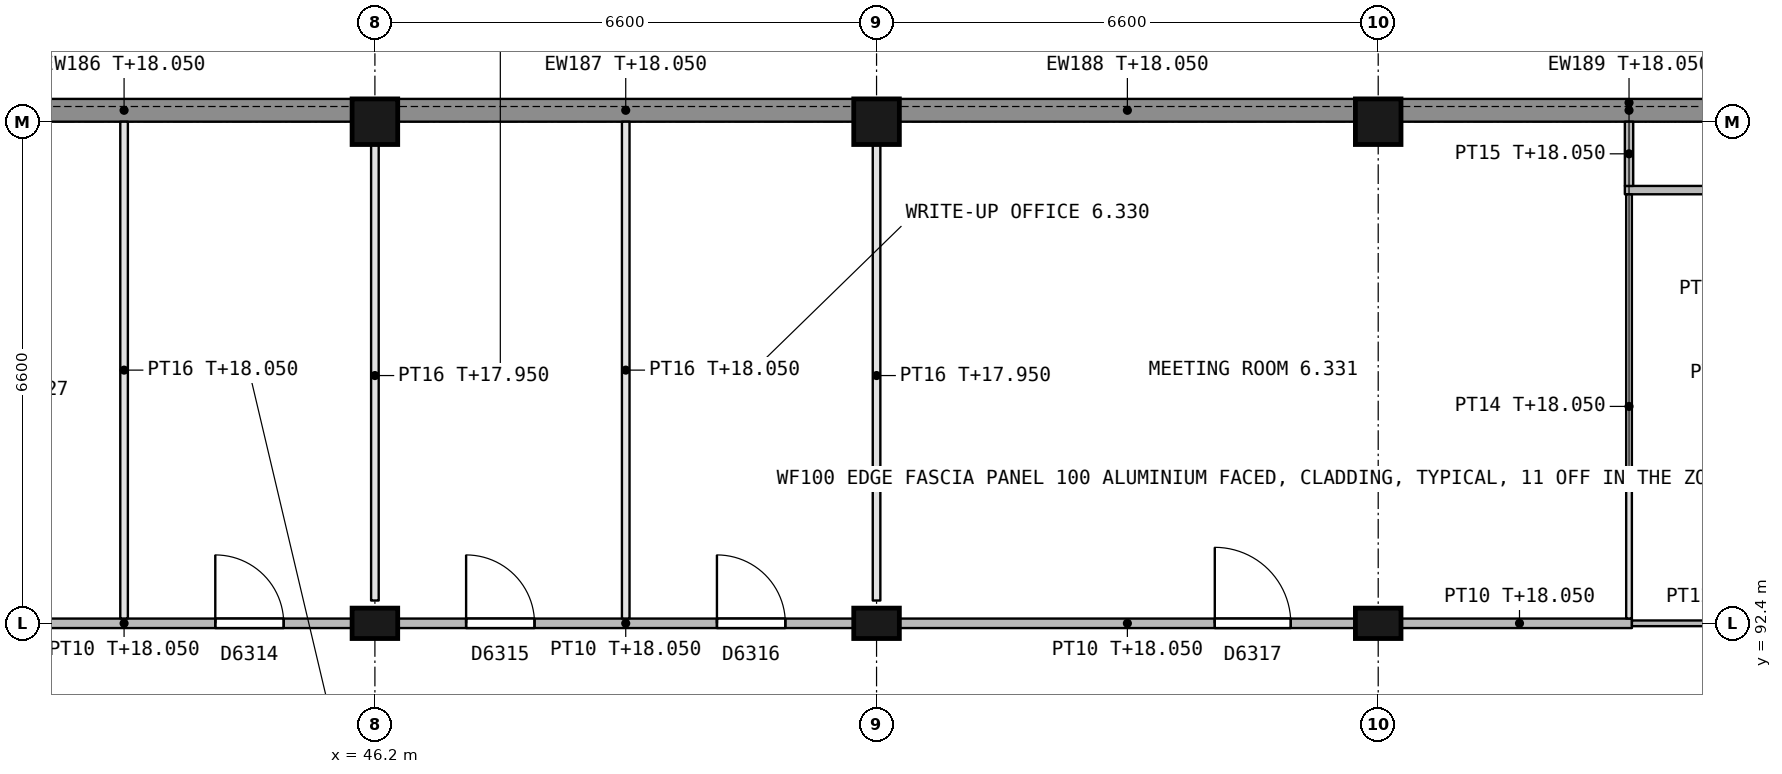
"""IFC4 building model, lengths in metres.
Left out: names, types, materials, properties, quantities, classifications, styles, units other than length and angle.
Written with IfcOpenShell. Run it as: python <this file> out.ifc"""

import sys

from ifc_helpers import new_model, si_unit, direction, frame, frame_2d, origin, origin_2d, place, context, subcontext, project, spatial, rectangle, extrude, element, fill, save


model = new_model("IFC4")
c1 = context("Model", 3, precision=1e-05, world=origin(), true_north=direction((0.0, 1.0)))
c2 = subcontext(c1, "Body", "Model", "MODEL_VIEW")
j1 = project(units=[si_unit("LENGTHUNIT", "METRE"), si_unit("PLANEANGLEUNIT", "RADIAN")], contexts=[c1])
p1 = place(None, origin())
s1 = spatial("IfcSite", under=j1, at=p1, CompositionType="ELEMENT")
p2 = place(p1, origin())
s2 = spatial("IfcBuilding", under=s1, at=p2, CompositionType="ELEMENT")
p3 = place(p2, frame((0.0, 0.0, 14.4)))
s3 = spatial("IfcBuildingStorey", under=s2, at=p3, CompositionType="ELEMENT", Elevation=14.4)
p4 = place(p3, frame((46.2, 92.4, 0.0), z_axis=(0.0, 0.0, 1.0), x_axis=(1.0, 0.0, 0.0)))
e1 = element("IfcColumn", 1, at=p4, inside=s3, PredefinedType="COLUMN", context=c2, shape_type="SweptSolid", body=[
    extrude(rectangle(XDim=0.6, YDim=0.4, at=origin_2d()), origin(), (0.0, 0.0, 1.0), 4.5),
])
p5 = place(p3, frame((46.2, 99.0, 0.0), z_axis=(0.0, 0.0, 1.0), x_axis=(1.0, 0.0, 0.0)))
e2 = element("IfcColumn", 2, at=p5, inside=s3, PredefinedType="COLUMN", context=c2, shape_type="SweptSolid", body=[
    extrude(rectangle(XDim=0.6, YDim=0.6, at=origin_2d()), origin(), (0.0, 0.0, 1.0), 4.5),
])
p6 = place(p3, frame((52.8, 92.4, 0.0), z_axis=(0.0, 0.0, 1.0), x_axis=(1.0, 0.0, 0.0)))
e3 = element("IfcColumn", 3, at=p6, inside=s3, PredefinedType="COLUMN", context=c2, shape_type="SweptSolid", body=[
    extrude(rectangle(XDim=0.6, YDim=0.4, at=origin_2d()), origin(), (0.0, 0.0, 1.0), 4.5),
])
p7 = place(p3, frame((52.8, 99.0, 0.0), z_axis=(0.0, 0.0, 1.0), x_axis=(1.0, 0.0, 0.0)))
e4 = element("IfcColumn", 4, at=p7, inside=s3, PredefinedType="COLUMN", context=c2, shape_type="SweptSolid", body=[
    extrude(rectangle(XDim=0.6, YDim=0.6, at=origin_2d()), origin(), (0.0, 0.0, 1.0), 4.5),
])
p8 = place(p3, frame((59.4, 92.4, 0.0), z_axis=(0.0, 0.0, 1.0), x_axis=(1.0, 0.0, 0.0)))
e5 = element("IfcColumn", 5, at=p8, inside=s3, PredefinedType="COLUMN", context=c2, shape_type="SweptSolid", body=[
    extrude(rectangle(XDim=0.6, YDim=0.4, at=origin_2d()), origin(), (0.0, 0.0, 1.0), 4.5),
])
p9 = place(p3, frame((59.4, 99.0, 0.0), z_axis=(0.0, 0.0, 1.0), x_axis=(1.0, 0.0, 0.0)))
e6 = element("IfcColumn", 6, at=p9, inside=s3, PredefinedType="COLUMN", context=c2, shape_type="SweptSolid", body=[
    extrude(rectangle(XDim=0.6, YDim=0.6, at=origin_2d()), origin(), (0.0, 0.0, 1.0), 4.5),
])
for number, where, z_axis, x_axis in (
    (7, (39.9, 99.15, 0.0), (0.0, 0.0, 1.0), (1.0, 0.0, 0.0)),
    (8, (46.5, 99.15, 0.0), (0.0, 0.0, 1.0), (1.0, 0.0, 0.0)),
    (9, (53.1, 99.15, 0.0), (0.0, 0.0, 1.0), (1.0, 0.0, 0.0)),
    (10, (59.7, 99.15, 0.0), (0.0, 0.0, 1.0), (1.0, 0.0, 0.0)),
):
    element("IfcWall", number, at=place(p3, frame(where, z_axis=z_axis, x_axis=x_axis)), inside=s3, PredefinedType="STANDARD", context=c2, shape_type="SweptSolid", body=[
        extrude(rectangle(XDim=6.0, YDim=0.3, at=frame_2d((3.0, 0.0))), origin(), (0.0, 0.0, 1.0), 3.65),
    ])
p10 = place(p3, frame((39.9, 92.4, 0.0), z_axis=(0.0, 0.0, 1.0), x_axis=(1.0, 0.0, 0.0)))
e11 = element("IfcWall", 11, at=p10, inside=s3, PredefinedType="PARTITIONING", context=c2, shape_type="SweptSolid", body=[
    extrude(rectangle(XDim=6.0, YDim=0.125, at=frame_2d((3.0, 0.0))), origin(), (0.0, 0.0, 1.0), 3.65),
])
p11 = place(p10, frame((0.9, 0.0, 0.0)))
e12 = element("IfcOpeningElement", 12, at=p11, cuts=e11, PredefinedType="OPENING", context=c2, shape_type="SweptSolid", body=[
    extrude(rectangle(XDim=0.9, YDim=2.1, at=frame_2d((0.45, 1.05))), frame((0.0, 0.073, 0.0), z_axis=(0.0, -1.0, 0.0), x_axis=(1.0, 0.0, 0.0)), (0.0, 0.0, 1.0), 0.145),
])
p12 = place(p10, frame((4.2, 0.0, 0.0)))
e13 = element("IfcOpeningElement", 13, at=p12, cuts=e11, PredefinedType="OPENING", context=c2, shape_type="SweptSolid", body=[
    extrude(rectangle(XDim=0.9, YDim=2.1, at=frame_2d((0.45, 1.05))), frame((0.0, 0.073, 0.0), z_axis=(0.0, -1.0, 0.0), x_axis=(1.0, 0.0, 0.0)), (0.0, 0.0, 1.0), 0.145),
])
p13 = place(p3, frame((46.5, 92.4, 0.0), z_axis=(0.0, 0.0, 1.0), x_axis=(1.0, 0.0, 0.0)))
e14 = element("IfcWall", 14, at=p13, inside=s3, PredefinedType="PARTITIONING", context=c2, shape_type="SweptSolid", body=[
    extrude(rectangle(XDim=6.0, YDim=0.125, at=frame_2d((3.0, 0.0))), origin(), (0.0, 0.0, 1.0), 3.65),
])
p14 = place(p13, frame((0.9, 0.0, 0.0)))
e15 = element("IfcOpeningElement", 15, at=p14, cuts=e14, PredefinedType="OPENING", context=c2, shape_type="SweptSolid", body=[
    extrude(rectangle(XDim=0.9, YDim=2.1, at=frame_2d((0.45, 1.05))), frame((0.0, 0.073, 0.0), z_axis=(0.0, -1.0, 0.0), x_axis=(1.0, 0.0, 0.0)), (0.0, 0.0, 1.0), 0.145),
])
p15 = place(p13, frame((4.2, 0.0, 0.0)))
e16 = element("IfcOpeningElement", 16, at=p15, cuts=e14, PredefinedType="OPENING", context=c2, shape_type="SweptSolid", body=[
    extrude(rectangle(XDim=0.9, YDim=2.1, at=frame_2d((0.45, 1.05))), frame((0.0, 0.073, 0.0), z_axis=(0.0, -1.0, 0.0), x_axis=(1.0, 0.0, 0.0)), (0.0, 0.0, 1.0), 0.145),
])
p16 = place(p3, frame((53.1, 92.4, 0.0), z_axis=(0.0, 0.0, 1.0), x_axis=(1.0, 0.0, 0.0)))
e17 = element("IfcWall", 17, at=p16, inside=s3, PredefinedType="PARTITIONING", context=c2, shape_type="SweptSolid", body=[
    extrude(rectangle(XDim=6.0, YDim=0.125, at=frame_2d((3.0, 0.0))), origin(), (0.0, 0.0, 1.0), 3.65),
])
p17 = place(p16, frame((4.15, 0.0, 0.0)))
e18 = element("IfcOpeningElement", 18, at=p17, cuts=e17, PredefinedType="OPENING", context=c2, shape_type="SweptSolid", body=[
    extrude(rectangle(XDim=1.0, YDim=2.1, at=frame_2d((0.5, 1.05))), frame((0.0, 0.073, 0.0), z_axis=(0.0, -1.0, 0.0), x_axis=(1.0, 0.0, 0.0)), (0.0, 0.0, 1.0), 0.145),
])
p18 = place(p3, frame((59.7, 92.4, 0.0), z_axis=(0.0, 0.0, 1.0), x_axis=(1.0, 0.0, 0.0)))
e19 = element("IfcWall", 19, at=p18, inside=s3, PredefinedType="PARTITIONING", context=c2, shape_type="SweptSolid", body=[
    extrude(rectangle(XDim=3.038, YDim=0.125, at=frame_2d((1.519, 0.0))), origin(), (0.0, 0.0, 1.0), 3.65),
])
p19 = place(p3, frame((62.738, 92.4, 0.0), z_axis=(0.0, 0.0, 1.0), x_axis=(1.0, 0.0, 0.0)))
e20 = element("IfcWall", 20, at=p19, inside=s3, PredefinedType="PARTITIONING", context=c2, shape_type="SweptSolid", body=[
    extrude(rectangle(XDim=2.962, YDim=0.075, at=frame_2d((1.481, 0.0))), origin(), (0.0, 0.0, 1.0), 3.65),
])
p20 = place(p3, frame((66.055, 98.1, 0.0), z_axis=(0.0, 0.0, 1.0), x_axis=(-1.0, 0.0, 0.0)))
e21 = element("IfcWall", 21, at=p20, inside=s3, PredefinedType="PARTITIONING", context=c2, shape_type="SweptSolid", body=[
    extrude(rectangle(XDim=3.41, YDim=0.11, at=frame_2d((1.705, 0.0))), origin(), (0.0, 0.0, 1.0), 3.55),
])
p21 = place(p20, frame((1.405, 0.0, 0.0)))
e22 = element("IfcOpeningElement", 22, at=p21, cuts=e21, PredefinedType="OPENING", context=c2, shape_type="SweptSolid", body=[
    extrude(rectangle(XDim=0.6, YDim=2.1, at=frame_2d((0.3, 1.05))), frame((0.0, 0.065, 0.0), z_axis=(0.0, -1.0, 0.0), x_axis=(1.0, 0.0, 0.0)), (0.0, 0.0, 1.0), 0.13),
])
p22 = place(p3, frame((42.9, 92.463, 0.0), z_axis=(0.0, 0.0, 1.0), x_axis=(0.0, 1.0, 0.0)))
e23 = element("IfcWall", 23, at=p22, inside=s3, PredefinedType="PARTITIONING", context=c2, shape_type="SweptSolid", body=[
    extrude(rectangle(XDim=6.537, YDim=0.1, at=frame_2d((3.269, 0.0))), origin(), (0.0, 0.0, 1.0), 3.65),
])
p23 = place(p3, frame((46.2, 92.7, 0.0), z_axis=(0.0, 0.0, 1.0), x_axis=(0.0, 1.0, 0.0)))
e24 = element("IfcWall", 24, at=p23, inside=s3, PredefinedType="PARTITIONING", context=c2, shape_type="SweptSolid", body=[
    extrude(rectangle(XDim=6.0, YDim=0.1, at=frame_2d((3.0, 0.0))), origin(), (0.0, 0.0, 1.0), 3.55),
])
p24 = place(p3, frame((49.5, 92.463, 0.0), z_axis=(0.0, 0.0, 1.0), x_axis=(0.0, 1.0, 0.0)))
e25 = element("IfcWall", 25, at=p24, inside=s3, PredefinedType="PARTITIONING", context=c2, shape_type="SweptSolid", body=[
    extrude(rectangle(XDim=6.537, YDim=0.1, at=frame_2d((3.269, 0.0))), origin(), (0.0, 0.0, 1.0), 3.65),
])
p25 = place(p3, frame((52.8, 92.7, 0.0), z_axis=(0.0, 0.0, 1.0), x_axis=(0.0, 1.0, 0.0)))
e26 = element("IfcWall", 26, at=p25, inside=s3, PredefinedType="PARTITIONING", context=c2, shape_type="SweptSolid", body=[
    extrude(rectangle(XDim=6.0, YDim=0.1, at=frame_2d((3.0, 0.0))), origin(), (0.0, 0.0, 1.0), 3.55),
])
p26 = place(p3, frame((62.7, 92.463, 0.0), z_axis=(0.0, 0.0, 1.0), x_axis=(0.0, 1.0, 0.0)))
e27 = element("IfcWall", 27, at=p26, inside=s3, PredefinedType="PARTITIONING", context=c2, shape_type="SweptSolid", body=[
    extrude(rectangle(XDim=5.582, YDim=0.075, at=frame_2d((2.791, 0.0))), origin(), (0.0, 0.0, 1.0), 3.65),
])
p27 = place(p3, frame((62.7, 98.155, 0.0), z_axis=(0.0, 0.0, 1.0), x_axis=(0.0, 1.0, 0.0)))
e28 = element("IfcWall", 28, at=p27, inside=s3, PredefinedType="PARTITIONING", context=c2, shape_type="SweptSolid", body=[
    extrude(rectangle(XDim=0.845, YDim=0.11, at=frame_2d((0.422, 0.0))), origin(), (0.0, 0.0, 1.0), 3.65),
])
p28 = place(p12, origin())
e29 = element("IfcDoor", 29, at=p28, inside=s3, OperationType="SINGLE_SWING_LEFT", PredefinedType="DOOR", context=c2, shape_type="SweptSolid", body=[
    extrude(rectangle(XDim=0.9, YDim=2.1, at=frame_2d((0.45, 1.05))), frame((0.0, 0.025, 0.0), z_axis=(0.0, -1.0, 0.0), x_axis=(1.0, 0.0, 0.0)), (0.0, 0.0, 1.0), 0.05),
])
fill(e13, e29)
p29 = place(p14, origin())
e30 = element("IfcDoor", 30, at=p29, inside=s3, OperationType="SINGLE_SWING_LEFT", PredefinedType="DOOR", context=c2, shape_type="SweptSolid", body=[
    extrude(rectangle(XDim=0.9, YDim=2.1, at=frame_2d((0.45, 1.05))), frame((0.0, 0.025, 0.0), z_axis=(0.0, -1.0, 0.0), x_axis=(1.0, 0.0, 0.0)), (0.0, 0.0, 1.0), 0.05),
])
fill(e15, e30)
p30 = place(p15, origin())
e31 = element("IfcDoor", 31, at=p30, inside=s3, OperationType="SINGLE_SWING_LEFT", PredefinedType="DOOR", context=c2, shape_type="SweptSolid", body=[
    extrude(rectangle(XDim=0.9, YDim=2.1, at=frame_2d((0.45, 1.05))), frame((0.0, 0.025, 0.0), z_axis=(0.0, -1.0, 0.0), x_axis=(1.0, 0.0, 0.0)), (0.0, 0.0, 1.0), 0.05),
])
fill(e16, e31)
p31 = place(p17, origin())
e32 = element("IfcDoor", 32, at=p31, inside=s3, OperationType="SINGLE_SWING_LEFT", PredefinedType="DOOR", context=c2, shape_type="SweptSolid", body=[
    extrude(rectangle(XDim=1.0, YDim=2.1, at=frame_2d((0.5, 1.05))), frame((0.0, 0.025, 0.0), z_axis=(0.0, -1.0, 0.0), x_axis=(1.0, 0.0, 0.0)), (0.0, 0.0, 1.0), 0.05),
])
fill(e18, e32)
save(model, sys.argv[1])
